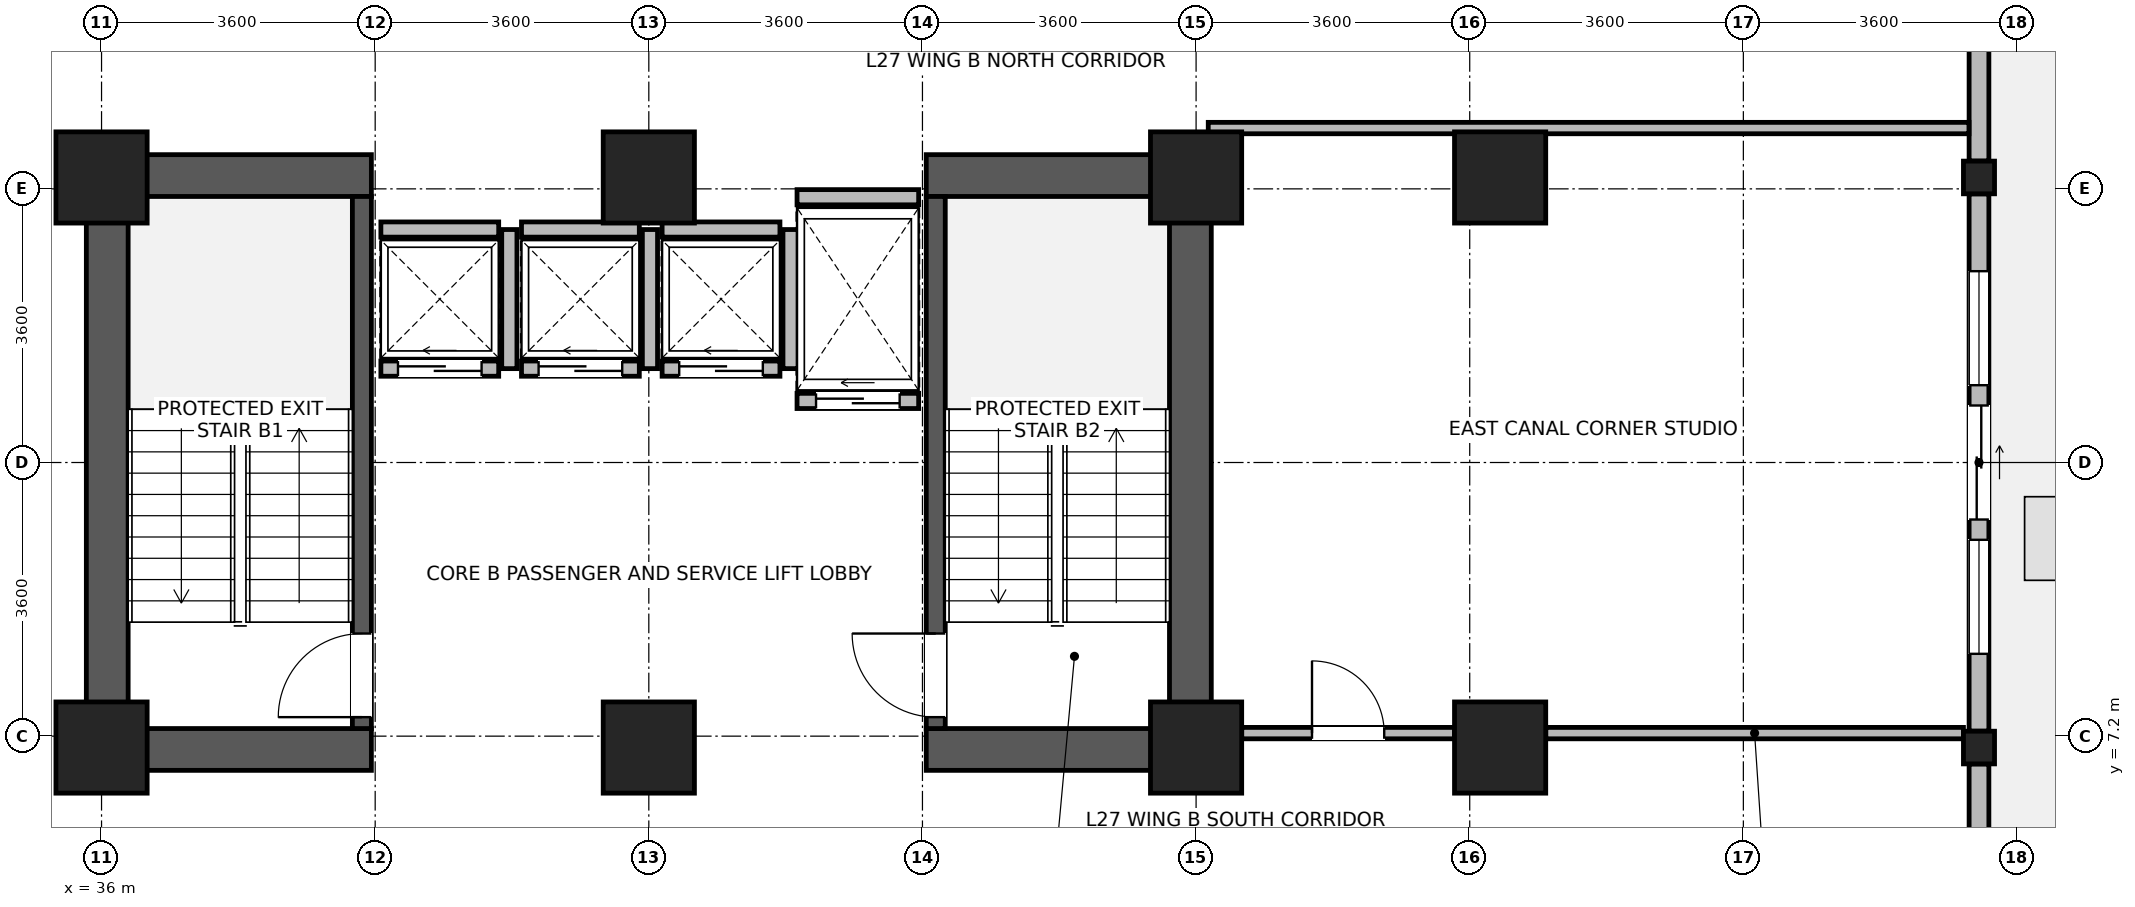
"""IFC4 building model, lengths in metres.
Left out: names, types, materials, properties, quantities, classifications, styles, units other than length and angle.
Written with IfcOpenShell. Run it as: python <this file> out.ifc"""

import sys

from ifc_helpers import new_model, si_unit, direction, frame, frame_2d, origin, origin_2d, place, context, subcontext, project, spatial, rectangle, i_section, extrude, source, transform, mapped, element, fill, save


model = new_model("IFC4")
c1 = context("Model", 3, precision=1e-05, world=origin(), true_north=direction((0.0, 1.0)))
c2 = subcontext(c1, "Body", "Model", "MODEL_VIEW")
j1 = project(units=[si_unit("LENGTHUNIT", "METRE"), si_unit("PLANEANGLEUNIT", "RADIAN")], contexts=[c1])
p1 = place(None, origin())
s1 = spatial("IfcSite", under=j1, at=p1, CompositionType="ELEMENT")
p2 = place(p1, origin())
s2 = spatial("IfcBuilding", under=s1, at=p2, CompositionType="ELEMENT")
p3 = place(p2, frame((0.0, 0.0, 108.2)))
s3 = spatial("IfcBuildingStorey", under=s2, at=p3, CompositionType="ELEMENT", Elevation=108.2)
for number, where, z_axis, x_axis in (
    (1, (36.075, 6.75, 0.0), (0.0, 0.0, 1.0), (0.0, 1.0, 0.0)),
    (2, (50.325, 6.75, 0.0), (0.0, 0.0, 1.0), (0.0, 1.0, 0.0)),
):
    element("IfcWall", number, at=place(p3, frame(where, z_axis=z_axis, x_axis=x_axis)), inside=s3, PredefinedType="SHEAR", context=c2, shape_type="SweptSolid", body=[
        extrude(rectangle(XDim=8.1, YDim=0.55, at=frame_2d((4.05, 0.0))), origin(), (0.0, 0.0, 1.0), 3.45),
    ])
for number, where, z_axis, x_axis in (
    (3, (36.35, 7.025, 0.0), (0.0, 0.0, 1.0), (1.0, 0.0, 0.0)),
    (4, (46.85, 7.025, 0.0), (0.0, 0.0, 1.0), (1.0, 0.0, 0.0)),
    (5, (36.35, 14.575, 0.0), (0.0, 0.0, 1.0), (1.0, 0.0, 0.0)),
    (6, (46.85, 14.575, 0.0), (0.0, 0.0, 1.0), (1.0, 0.0, 0.0)),
):
    element("IfcWall", number, at=place(p3, frame(where, z_axis=z_axis, x_axis=x_axis)), inside=s3, PredefinedType="SHEAR", context=c2, shape_type="SweptSolid", body=[
        extrude(rectangle(XDim=3.2, YDim=0.55, at=frame_2d((1.6, 0.0))), origin(), (0.0, 0.0, 1.0), 3.45),
    ])
p4 = place(p3, frame((39.425, 7.3, 0.0), z_axis=(0.0, 0.0, 1.0), x_axis=(0.0, 1.0, 0.0)))
e7 = element("IfcWall", 7, at=p4, inside=s3, PredefinedType="SHEAR", context=c2, shape_type="SweptSolid", body=[
    extrude(rectangle(XDim=7.0, YDim=0.25, at=frame_2d((3.5, 0.0))), origin(), (0.0, 0.0, 1.0), 3.45),
])
p5 = place(p4, frame((0.15, 0.0, 0.0)))
e8 = element("IfcOpeningElement", 8, at=p5, cuts=e7, PredefinedType="OPENING", context=c2, shape_type="SweptSolid", body=[
    extrude(rectangle(XDim=1.1, YDim=2.08, at=frame_2d((0.55, 1.04))), frame((0.0, 0.135, 0.0), z_axis=(0.0, -1.0, 0.0), x_axis=(1.0, 0.0, 0.0)), (0.0, 0.0, 1.0), 0.27),
])
p6 = place(p3, frame((46.975, 7.3, 0.0), z_axis=(0.0, 0.0, 1.0), x_axis=(0.0, 1.0, 0.0)))
e9 = element("IfcWall", 9, at=p6, inside=s3, PredefinedType="SHEAR", context=c2, shape_type="SweptSolid", body=[
    extrude(rectangle(XDim=7.0, YDim=0.25, at=frame_2d((3.5, 0.0))), origin(), (0.0, 0.0, 1.0), 3.45),
])
p7 = place(p6, frame((0.15, 0.0, 0.0)))
e10 = element("IfcOpeningElement", 10, at=p7, cuts=e9, PredefinedType="OPENING", context=c2, shape_type="SweptSolid", body=[
    extrude(rectangle(XDim=1.1, YDim=2.08, at=frame_2d((0.55, 1.04))), frame((0.0, 0.135, 0.0), z_axis=(0.0, -1.0, 0.0), x_axis=(1.0, 0.0, 0.0)), (0.0, 0.0, 1.0), 0.27),
])
m1 = source(origin(), c2, "Body", "SweptSolid", [
    extrude(rectangle(XDim=1.2, YDim=1.2, at=origin_2d()), origin(), (0.0, 0.0, 1.0), 3.7),
])
for number, where, z_axis, x_axis in (
    (11, (36.0, 7.05, 0.0), (0.0, 0.0, 1.0), (1.0, 0.0, 0.0)),
    (12, (36.0, 14.55, 0.0), (0.0, 0.0, 1.0), (1.0, 0.0, 0.0)),
    (13, (43.2, 7.05, 0.0), (0.0, 0.0, 1.0), (1.0, 0.0, 0.0)),
    (14, (43.2, 14.55, 0.0), (0.0, 0.0, 1.0), (1.0, 0.0, 0.0)),
    (15, (50.4, 7.05, 0.0), (0.0, 0.0, 1.0), (1.0, 0.0, 0.0)),
    (16, (50.4, 14.55, 0.0), (0.0, 0.0, 1.0), (1.0, 0.0, 0.0)),
    (17, (54.4, 7.05, 0.0), (0.0, 0.0, 1.0), (1.0, 0.0, 0.0)),
    (18, (54.4, 14.55, 0.0), (0.0, 0.0, 1.0), (1.0, 0.0, 0.0)),
):
    element("IfcColumn", number, at=place(p3, frame(where, z_axis=z_axis, x_axis=x_axis)), inside=s3, PredefinedType="COLUMN", context=c2, shape_type="MappedRepresentation", body=[
        mapped(m1, transform((0.0, 0.0, 0.0), x_axis=(1.0, 0.0, 0.0), y_axis=(0.0, 1.0, 0.0), z_axis=(0.0, 0.0, 1.0), scale=1.0)),
    ])
m2 = source(origin(), c2, "Body", "SweptSolid", [
    extrude(i_section(OverallWidth=0.409, OverallDepth=0.43, WebThickness=0.024, FlangeThickness=0.033, FilletRadius=0.015, at=origin_2d()), origin(), (0.0, 0.0, 1.0), 3.7),
])
for number, where, z_axis, x_axis in (
    (19, (60.7, 7.05, 0.0), (0.0, 0.0, 1.0), (1.0, 0.0, 0.0)),
    (20, (60.7, 14.55, 0.0), (0.0, 0.0, 1.0), (1.0, 0.0, 0.0)),
):
    element("IfcColumn", number, at=place(p3, frame(where, z_axis=z_axis, x_axis=x_axis)), inside=s3, PredefinedType="COLUMN", context=c2, shape_type="MappedRepresentation", body=[
        mapped(m2, transform((0.0, 0.0, 0.0), x_axis=(1.0, 0.0, 0.0), y_axis=(0.0, 1.0, 0.0), z_axis=(0.0, 0.0, 1.0), scale=1.0)),
    ])
p8 = place(p3, frame((60.7, 6.834, 0.0), z_axis=(0.0, 0.0, 1.0), x_axis=(0.0, -1.0, 0.0)))
e21 = element("IfcWall", 21, at=p8, inside=s3, PredefinedType="STANDARD", context=c2, shape_type="SweptSolid", body=[
    extrude(rectangle(XDim=2.164, YDim=0.26, at=frame_2d((1.082, 0.0))), origin(), (0.0, 0.0, 1.0), 3.43),
])
p9 = place(p3, frame((60.7, 14.334, 0.0), z_axis=(0.0, 0.0, 1.0), x_axis=(0.0, -1.0, 0.0)))
e22 = element("IfcWall", 22, at=p9, inside=s3, PredefinedType="STANDARD", context=c2, shape_type="SweptSolid", body=[
    extrude(rectangle(XDim=7.068, YDim=0.26, at=frame_2d((3.534, 0.0))), origin(), (0.0, 0.0, 1.0), 2.98),
])
p10 = place(p9, frame((2.784, 0.0, 0.0)))
e23 = element("IfcOpeningElement", 23, at=p10, cuts=e22, PredefinedType="OPENING", context=c2, shape_type="SweptSolid", body=[
    extrude(rectangle(XDim=1.5, YDim=2.15, at=frame_2d((0.75, 1.075))), frame((0.0, 0.14, 0.0), z_axis=(0.0, -1.0, 0.0), x_axis=(1.0, 0.0, 0.0)), (0.0, 0.0, 1.0), 0.28),
])
p11 = place(p9, frame((1.017, 0.0, 0.85)))
e24 = element("IfcOpeningElement", 24, at=p11, cuts=e22, PredefinedType="OPENING", context=c2, shape_type="SweptSolid", body=[
    extrude(rectangle(XDim=1.5, YDim=1.85, at=frame_2d((0.75, 0.925))), frame((0.0, 0.14, 0.0), z_axis=(0.0, -1.0, 0.0), x_axis=(1.0, 0.0, 0.0)), (0.0, 0.0, 1.0), 0.28),
])
p12 = place(p9, frame((4.551, 0.0, 0.85)))
e25 = element("IfcOpeningElement", 25, at=p12, cuts=e22, PredefinedType="OPENING", context=c2, shape_type="SweptSolid", body=[
    extrude(rectangle(XDim=1.5, YDim=1.85, at=frame_2d((0.75, 0.925))), frame((0.0, 0.14, 0.0), z_axis=(0.0, -1.0, 0.0), x_axis=(1.0, 0.0, 0.0)), (0.0, 0.0, 1.0), 0.28),
])
p13 = place(p3, frame((60.7, 21.384, 0.0), z_axis=(0.0, 0.0, 1.0), x_axis=(0.0, -1.0, 0.0)))
e26 = element("IfcWall", 26, at=p13, inside=s3, PredefinedType="STANDARD", context=c2, shape_type="SweptSolid", body=[
    extrude(rectangle(XDim=6.618, YDim=0.26, at=frame_2d((3.309, 0.0))), origin(), (0.0, 0.0, 1.0), 2.98),
])
p14 = place(p13, frame((0.905, 0.0, 0.85)))
e27 = element("IfcOpeningElement", 27, at=p14, cuts=e26, PredefinedType="OPENING", context=c2, shape_type="SweptSolid", body=[
    extrude(rectangle(XDim=1.5, YDim=1.85, at=frame_2d((0.75, 0.925))), frame((0.0, 0.14, 0.0), z_axis=(0.0, -1.0, 0.0), x_axis=(1.0, 0.0, 0.0)), (0.0, 0.0, 1.0), 0.28),
])
p15 = place(p13, frame((2.834, 0.0, 0.85)))
e28 = element("IfcOpeningElement", 28, at=p15, cuts=e26, PredefinedType="OPENING", context=c2, shape_type="SweptSolid", body=[
    extrude(rectangle(XDim=0.95, YDim=1.75, at=frame_2d((0.475, 0.875))), frame((0.0, 0.14, 0.0), z_axis=(0.0, -1.0, 0.0), x_axis=(1.0, 0.0, 0.0)), (0.0, 0.0, 1.0), 0.28),
])
p16 = place(p3, frame((39.675, 12.035, 0.0), z_axis=(0.0, 0.0, 1.0), x_axis=(1.0, 0.0, 0.0)))
e29 = element("IfcWall", 29, at=p16, inside=s3, PredefinedType="PARTITIONING", context=c2, shape_type="SweptSolid", body=[
    extrude(rectangle(XDim=1.55, YDim=0.2, at=frame_2d((0.775, 0.0))), origin(), (0.0, 0.0, 1.0), 3.43),
])
p17 = place(p16, frame((0.225, 0.0, 0.0)))
e30 = element("IfcOpeningElement", 30, at=p17, cuts=e29, PredefinedType="OPENING", context=c2, shape_type="SweptSolid", body=[
    extrude(rectangle(XDim=1.1, YDim=2.12, at=frame_2d((0.55, 1.06))), frame((0.0, 0.11, 0.0), z_axis=(0.0, -1.0, 0.0), x_axis=(1.0, 0.0, 0.0)), (0.0, 0.0, 1.0), 0.22),
])
p18 = place(p3, frame((39.675, 13.865, 0.0), z_axis=(0.0, 0.0, 1.0), x_axis=(1.0, 0.0, 0.0)))
e31 = element("IfcWall", 31, at=p18, inside=s3, PredefinedType="PARTITIONING", context=c2, shape_type="SweptSolid", body=[
    extrude(rectangle(XDim=1.55, YDim=0.2, at=frame_2d((0.775, 0.0))), origin(), (0.0, 0.0, 1.0), 3.43),
])
p19 = place(p3, frame((41.365, 12.035, 0.0), z_axis=(0.0, 0.0, 1.0), x_axis=(0.0, 1.0, 0.0)))
e32 = element("IfcWall", 32, at=p19, inside=s3, PredefinedType="PARTITIONING", context=c2, shape_type="SweptSolid", body=[
    extrude(rectangle(XDim=1.83, YDim=0.2, at=frame_2d((0.915, 0.0))), origin(), (0.0, 0.0, 1.0), 3.43),
])
p20 = place(p3, frame((41.525, 12.035, 0.0), z_axis=(0.0, 0.0, 1.0), x_axis=(1.0, 0.0, 0.0)))
e33 = element("IfcWall", 33, at=p20, inside=s3, PredefinedType="PARTITIONING", context=c2, shape_type="SweptSolid", body=[
    extrude(rectangle(XDim=1.55, YDim=0.2, at=frame_2d((0.775, 0.0))), origin(), (0.0, 0.0, 1.0), 3.43),
])
p21 = place(p20, frame((0.225, 0.0, 0.0)))
e34 = element("IfcOpeningElement", 34, at=p21, cuts=e33, PredefinedType="OPENING", context=c2, shape_type="SweptSolid", body=[
    extrude(rectangle(XDim=1.1, YDim=2.12, at=frame_2d((0.55, 1.06))), frame((0.0, 0.11, 0.0), z_axis=(0.0, -1.0, 0.0), x_axis=(1.0, 0.0, 0.0)), (0.0, 0.0, 1.0), 0.22),
])
p22 = place(p3, frame((41.525, 13.865, 0.0), z_axis=(0.0, 0.0, 1.0), x_axis=(1.0, 0.0, 0.0)))
e35 = element("IfcWall", 35, at=p22, inside=s3, PredefinedType="PARTITIONING", context=c2, shape_type="SweptSolid", body=[
    extrude(rectangle(XDim=1.55, YDim=0.2, at=frame_2d((0.775, 0.0))), origin(), (0.0, 0.0, 1.0), 3.43),
])
p23 = place(p3, frame((43.215, 12.035, 0.0), z_axis=(0.0, 0.0, 1.0), x_axis=(0.0, 1.0, 0.0)))
e36 = element("IfcWall", 36, at=p23, inside=s3, PredefinedType="PARTITIONING", context=c2, shape_type="SweptSolid", body=[
    extrude(rectangle(XDim=1.83, YDim=0.2, at=frame_2d((0.915, 0.0))), origin(), (0.0, 0.0, 1.0), 3.43),
])
p24 = place(p3, frame((43.375, 12.035, 0.0), z_axis=(0.0, 0.0, 1.0), x_axis=(1.0, 0.0, 0.0)))
e37 = element("IfcWall", 37, at=p24, inside=s3, PredefinedType="PARTITIONING", context=c2, shape_type="SweptSolid", body=[
    extrude(rectangle(XDim=1.55, YDim=0.2, at=frame_2d((0.775, 0.0))), origin(), (0.0, 0.0, 1.0), 3.43),
])
p25 = place(p24, frame((0.225, 0.0, 0.0)))
e38 = element("IfcOpeningElement", 38, at=p25, cuts=e37, PredefinedType="OPENING", context=c2, shape_type="SweptSolid", body=[
    extrude(rectangle(XDim=1.1, YDim=2.12, at=frame_2d((0.55, 1.06))), frame((0.0, 0.11, 0.0), z_axis=(0.0, -1.0, 0.0), x_axis=(1.0, 0.0, 0.0)), (0.0, 0.0, 1.0), 0.22),
])
p26 = place(p3, frame((43.375, 13.865, 0.0), z_axis=(0.0, 0.0, 1.0), x_axis=(1.0, 0.0, 0.0)))
e39 = element("IfcWall", 39, at=p26, inside=s3, PredefinedType="PARTITIONING", context=c2, shape_type="SweptSolid", body=[
    extrude(rectangle(XDim=1.55, YDim=0.2, at=frame_2d((0.775, 0.0))), origin(), (0.0, 0.0, 1.0), 3.43),
])
p27 = place(p3, frame((45.065, 12.035, 0.0), z_axis=(0.0, 0.0, 1.0), x_axis=(0.0, 1.0, 0.0)))
e40 = element("IfcWall", 40, at=p27, inside=s3, PredefinedType="PARTITIONING", context=c2, shape_type="SweptSolid", body=[
    extrude(rectangle(XDim=1.83, YDim=0.2, at=frame_2d((0.915, 0.0))), origin(), (0.0, 0.0, 1.0), 3.43),
])
p28 = place(p3, frame((45.15, 11.61, 0.0), z_axis=(0.0, 0.0, 1.0), x_axis=(1.0, 0.0, 0.0)))
e41 = element("IfcWall", 41, at=p28, inside=s3, PredefinedType="PARTITIONING", context=c2, shape_type="SweptSolid", body=[
    extrude(rectangle(XDim=1.6, YDim=0.2, at=frame_2d((0.8, 0.0))), origin(), (0.0, 0.0, 1.0), 3.43),
])
p29 = place(p28, frame((0.25, 0.0, 0.0)))
e42 = element("IfcOpeningElement", 42, at=p29, cuts=e41, PredefinedType="OPENING", context=c2, shape_type="SweptSolid", body=[
    extrude(rectangle(XDim=1.1, YDim=2.12, at=frame_2d((0.55, 1.06))), frame((0.0, 0.11, 0.0), z_axis=(0.0, -1.0, 0.0), x_axis=(1.0, 0.0, 0.0)), (0.0, 0.0, 1.0), 0.22),
])
p30 = place(p3, frame((45.15, 14.29, 0.0), z_axis=(0.0, 0.0, 1.0), x_axis=(1.0, 0.0, 0.0)))
e43 = element("IfcWall", 43, at=p30, inside=s3, PredefinedType="PARTITIONING", context=c2, shape_type="SweptSolid", body=[
    extrude(rectangle(XDim=1.6, YDim=0.2, at=frame_2d((0.8, 0.0))), origin(), (0.0, 0.0, 1.0), 2.43),
])
p31 = place(p3, frame((51.0, 7.24, 0.0), z_axis=(0.0, 0.0, 1.0), x_axis=(1.0, 0.0, 0.0)))
e44 = element("IfcWall", 44, at=p31, inside=s3, PredefinedType="PARTITIONING", context=c2, shape_type="SweptSolid", body=[
    extrude(rectangle(XDim=2.8, YDim=0.15, at=frame_2d((1.4, 0.0))), origin(), (0.0, 0.0, 1.0), 2.78),
])
p32 = place(p31, frame((0.925, 0.0, 0.0)))
e45 = element("IfcOpeningElement", 45, at=p32, cuts=e44, PredefinedType="OPENING", context=c2, shape_type="SweptSolid", body=[
    extrude(rectangle(XDim=0.95, YDim=2.1, at=frame_2d((0.475, 1.05))), frame((0.0, 0.085, 0.0), z_axis=(0.0, -1.0, 0.0), x_axis=(1.0, 0.0, 0.0)), (0.0, 0.0, 1.0), 0.17),
])
p33 = place(p3, frame((55.0, 7.24, 0.0), z_axis=(0.0, 0.0, 1.0), x_axis=(1.0, 0.0, 0.0)))
e46 = element("IfcWall", 46, at=p33, inside=s3, PredefinedType="PARTITIONING", context=c2, shape_type="SweptSolid", body=[
    extrude(rectangle(XDim=5.496, YDim=0.15, at=frame_2d((2.748, 0.0))), origin(), (0.0, 0.0, 1.0), 2.78),
])
p34 = place(p3, frame((50.56, 15.2, 0.0), z_axis=(0.0, 0.0, 1.0), x_axis=(1.0, 0.0, 0.0)))
e47 = element("IfcWall", 47, at=p34, inside=s3, PredefinedType="PARTITIONING", context=c2, shape_type="SweptSolid", body=[
    extrude(rectangle(XDim=10.008, YDim=0.15, at=frame_2d((5.004, 0.0))), origin(), (0.0, 0.0, 1.0), 3.43),
])
p35 = place(p10, origin())
e48 = element("IfcDoor", 48, at=p35, inside=s3, OperationType="SLIDING_TO_LEFT", PredefinedType="DOOR", context=c2, shape_type="SweptSolid", body=[
    extrude(rectangle(XDim=1.5, YDim=2.15, at=frame_2d((0.75, 1.075))), frame((0.0, 0.025, 0.0), z_axis=(0.0, -1.0, 0.0), x_axis=(1.0, 0.0, 0.0)), (0.0, 0.0, 1.0), 0.05),
])
fill(e23, e48)
p36 = place(p11, origin())
e49 = element("IfcWindow", 49, at=p36, inside=s3, PartitioningType="SINGLE_PANEL", PredefinedType="WINDOW", context=c2, shape_type="SweptSolid", body=[
    extrude(rectangle(XDim=1.5, YDim=1.85, at=frame_2d((0.75, 0.925))), frame((0.0, 0.03, 0.0), z_axis=(0.0, -1.0, 0.0), x_axis=(1.0, 0.0, 0.0)), (0.0, 0.0, 1.0), 0.06),
])
fill(e24, e49)
p37 = place(p12, origin())
e50 = element("IfcWindow", 50, at=p37, inside=s3, PartitioningType="SINGLE_PANEL", PredefinedType="WINDOW", context=c2, shape_type="SweptSolid", body=[
    extrude(rectangle(XDim=1.5, YDim=1.85, at=frame_2d((0.75, 0.925))), frame((0.0, 0.03, 0.0), z_axis=(0.0, -1.0, 0.0), x_axis=(1.0, 0.0, 0.0)), (0.0, 0.0, 1.0), 0.06),
])
fill(e25, e50)
p38 = place(p5, origin())
e51 = element("IfcDoor", 51, at=p38, inside=s3, OperationType="SINGLE_SWING_LEFT", PredefinedType="DOOR", context=c2, shape_type="SweptSolid", body=[
    extrude(rectangle(XDim=1.1, YDim=2.08, at=frame_2d((0.55, 1.04))), frame((0.0, 0.025, 0.0), z_axis=(0.0, -1.0, 0.0), x_axis=(1.0, 0.0, 0.0)), (0.0, 0.0, 1.0), 0.05),
])
fill(e8, e51)
p39 = place(p7, origin())
e52 = element("IfcDoor", 52, at=p39, inside=s3, OperationType="SINGLE_SWING_RIGHT", PredefinedType="DOOR", context=c2, shape_type="SweptSolid", body=[
    extrude(rectangle(XDim=1.1, YDim=2.08, at=frame_2d((0.55, 1.04))), frame((0.0, 0.025, 0.0), z_axis=(0.0, -1.0, 0.0), x_axis=(1.0, 0.0, 0.0)), (0.0, 0.0, 1.0), 0.05),
])
fill(e10, e52)
p40 = place(p17, origin())
e53 = element("IfcDoor", 53, at=p40, inside=s3, OperationType="SLIDING_TO_LEFT", PredefinedType="DOOR", context=c2, shape_type="SweptSolid", body=[
    extrude(rectangle(XDim=1.1, YDim=2.12, at=frame_2d((0.55, 1.06))), frame((0.0, 0.025, 0.0), z_axis=(0.0, -1.0, 0.0), x_axis=(1.0, 0.0, 0.0)), (0.0, 0.0, 1.0), 0.05),
])
fill(e30, e53)
p41 = place(p21, origin())
e54 = element("IfcDoor", 54, at=p41, inside=s3, OperationType="SLIDING_TO_LEFT", PredefinedType="DOOR", context=c2, shape_type="SweptSolid", body=[
    extrude(rectangle(XDim=1.1, YDim=2.12, at=frame_2d((0.55, 1.06))), frame((0.0, 0.025, 0.0), z_axis=(0.0, -1.0, 0.0), x_axis=(1.0, 0.0, 0.0)), (0.0, 0.0, 1.0), 0.05),
])
fill(e34, e54)
p42 = place(p25, origin())
e55 = element("IfcDoor", 55, at=p42, inside=s3, OperationType="SLIDING_TO_LEFT", PredefinedType="DOOR", context=c2, shape_type="SweptSolid", body=[
    extrude(rectangle(XDim=1.1, YDim=2.12, at=frame_2d((0.55, 1.06))), frame((0.0, 0.025, 0.0), z_axis=(0.0, -1.0, 0.0), x_axis=(1.0, 0.0, 0.0)), (0.0, 0.0, 1.0), 0.05),
])
fill(e38, e55)
p43 = place(p29, origin())
e56 = element("IfcDoor", 56, at=p43, inside=s3, OperationType="SLIDING_TO_LEFT", PredefinedType="DOOR", context=c2, shape_type="SweptSolid", body=[
    extrude(rectangle(XDim=1.1, YDim=2.12, at=frame_2d((0.55, 1.06))), frame((0.0, 0.025, 0.0), z_axis=(0.0, -1.0, 0.0), x_axis=(1.0, 0.0, 0.0)), (0.0, 0.0, 1.0), 0.05),
])
fill(e42, e56)
p44 = place(p32, origin())
e57 = element("IfcDoor", 57, at=p44, inside=s3, OperationType="SINGLE_SWING_LEFT", PredefinedType="DOOR", context=c2, shape_type="SweptSolid", body=[
    extrude(rectangle(XDim=0.95, YDim=2.1, at=frame_2d((0.475, 1.05))), frame((0.0, 0.025, 0.0), z_axis=(0.0, -1.0, 0.0), x_axis=(1.0, 0.0, 0.0)), (0.0, 0.0, 1.0), 0.05),
])
fill(e45, e57)
save(model, sys.argv[1])
